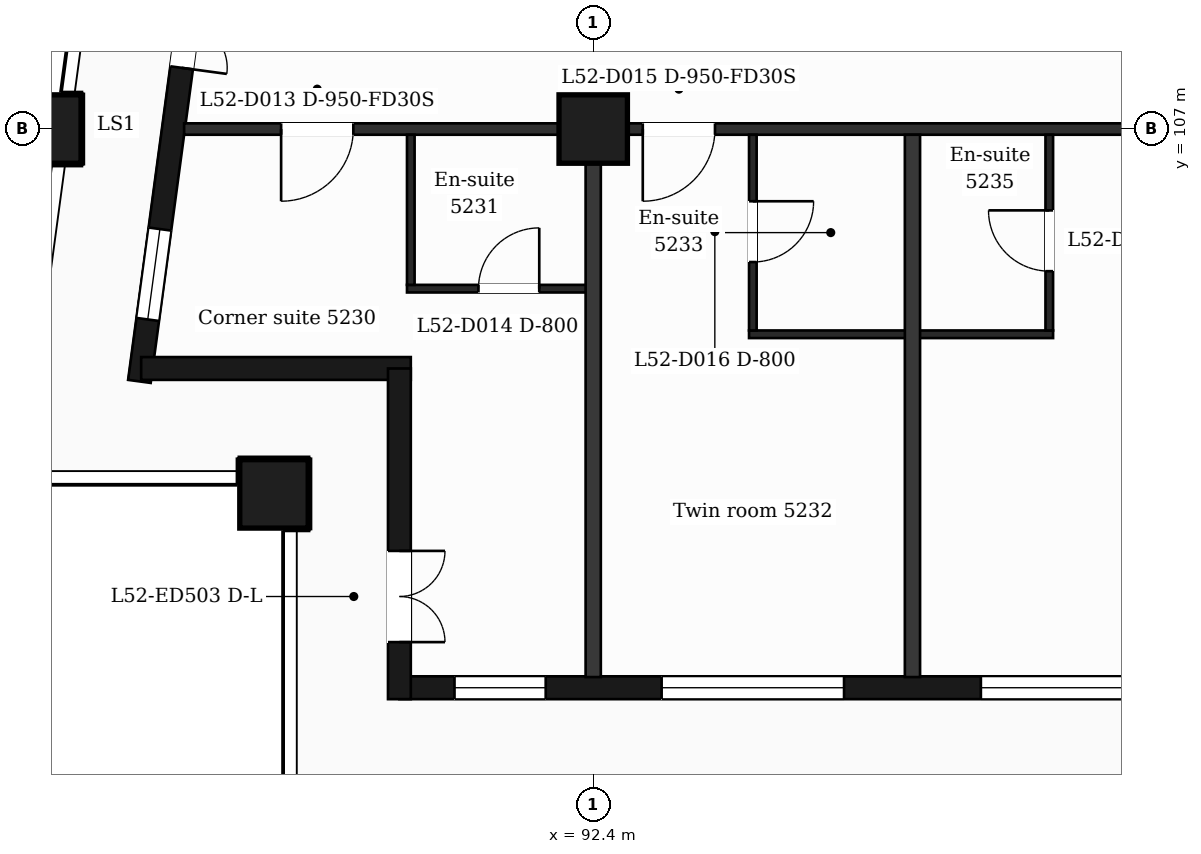
"""IFC4 building model, lengths in metres.
Left out: names, types, materials, properties, quantities, classifications, styles, units other than length and angle.
Written with IfcOpenShell. Run it as: python <this file> out.ifc"""

import sys

from ifc_helpers import new_model, si_unit, direction, frame, frame_2d, origin, origin_2d, place, context, subcontext, project, spatial, rectangle, extrude, element, fill, save


model = new_model("IFC4")
c1 = context("Model", 3, precision=1e-05, world=origin(), true_north=direction((0.0, 1.0)))
c2 = subcontext(c1, "Body", "Model", "MODEL_VIEW")
j1 = project(units=[si_unit("LENGTHUNIT", "METRE"), si_unit("PLANEANGLEUNIT", "RADIAN")], contexts=[c1])
p1 = place(None, origin())
s1 = spatial("IfcSite", under=j1, at=p1, CompositionType="ELEMENT")
p2 = place(p1, origin())
s2 = spatial("IfcBuilding", under=s1, at=p2, CompositionType="ELEMENT")
p3 = place(p2, frame((0.0, 0.0, 217.0)))
s3 = spatial("IfcBuildingStorey", under=s2, at=p3, CompositionType="ELEMENT", Elevation=217.0)
for number, where, z_axis, x_axis in (
    (1, (88.2, 102.2, 0.0), (0.0, 0.0, 1.0), (1.0, 0.0, 0.0)),
    (2, (92.4, 107.0, 0.0), (0.0, 0.0, 1.0), (1.0, 0.0, 0.0)),
    (3, (85.211, 107.0, 0.0), (0.0, 0.0, 1.0), (1.0, 0.0, 0.0)),
):
    element("IfcColumn", number, at=place(p3, frame(where, z_axis=z_axis, x_axis=x_axis)), inside=s3, PredefinedType="COLUMN", context=c2, shape_type="SweptSolid", body=[
        extrude(rectangle(XDim=0.9, YDim=0.9, at=origin_2d()), origin(), (0.0, 0.0, 1.0), 3.7),
    ])
p4 = place(p3, frame((89.85, 99.65, 0.0), z_axis=(0.0, 0.0, 1.0), x_axis=(1.0, 0.0, 0.0)))
e4 = element("IfcWall", 4, at=p4, inside=s3, PredefinedType="SOLIDWALL", context=c2, shape_type="SweptSolid", body=[
    extrude(rectangle(XDim=47.25, YDim=0.3, at=frame_2d((23.625, 0.0))), origin(), (0.0, 0.0, 1.0), 3.38),
])
p5 = place(p4, frame((0.725, 0.0, 0.9)))
e5 = element("IfcOpeningElement", 5, at=p5, cuts=e4, PredefinedType="OPENING", context=c2, shape_type="SweptSolid", body=[
    extrude(rectangle(XDim=1.2, YDim=2.1, at=frame_2d((0.6, 1.05))), frame((0.0, 0.16, 0.0), z_axis=(0.0, -1.0, 0.0), x_axis=(1.0, 0.0, 0.0)), (0.0, 0.0, 1.0), 0.32),
])
p6 = place(p4, frame((3.45, 0.0, 0.9)))
e6 = element("IfcOpeningElement", 6, at=p6, cuts=e4, PredefinedType="OPENING", context=c2, shape_type="SweptSolid", body=[
    extrude(rectangle(XDim=2.4, YDim=2.1, at=frame_2d((1.2, 1.05))), frame((0.0, 0.16, 0.0), z_axis=(0.0, -1.0, 0.0), x_axis=(1.0, 0.0, 0.0)), (0.0, 0.0, 1.0), 0.32),
])
p7 = place(p4, frame((7.65, 0.0, 0.9)))
e7 = element("IfcOpeningElement", 7, at=p7, cuts=e4, PredefinedType="OPENING", context=c2, shape_type="SweptSolid", body=[
    extrude(rectangle(XDim=2.4, YDim=2.1, at=frame_2d((1.2, 1.05))), frame((0.0, 0.16, 0.0), z_axis=(0.0, -1.0, 0.0), x_axis=(1.0, 0.0, 0.0)), (0.0, 0.0, 1.0), 0.32),
])
p8 = place(p4, frame((12.45, 0.0, 0.9)))
e8 = element("IfcOpeningElement", 8, at=p8, cuts=e4, PredefinedType="OPENING", context=c2, shape_type="SweptSolid", body=[
    extrude(rectangle(XDim=1.2, YDim=2.1, at=frame_2d((0.6, 1.05))), frame((0.0, 0.16, 0.0), z_axis=(0.0, -1.0, 0.0), x_axis=(1.0, 0.0, 0.0)), (0.0, 0.0, 1.0), 0.32),
])
p9 = place(p4, frame((16.65, 0.0, 0.9)))
e9 = element("IfcOpeningElement", 9, at=p9, cuts=e4, PredefinedType="OPENING", context=c2, shape_type="SweptSolid", body=[
    extrude(rectangle(XDim=1.2, YDim=2.1, at=frame_2d((0.6, 1.05))), frame((0.0, 0.16, 0.0), z_axis=(0.0, -1.0, 0.0), x_axis=(1.0, 0.0, 0.0)), (0.0, 0.0, 1.0), 0.32),
])
p10 = place(p4, frame((19.95, 0.0, 0.0)))
e10 = element("IfcOpeningElement", 10, at=p10, cuts=e4, PredefinedType="OPENING", context=c2, shape_type="SweptSolid", body=[
    extrude(rectangle(XDim=1.2, YDim=2.4, at=frame_2d((0.6, 1.2))), frame((0.0, 0.16, 0.0), z_axis=(0.0, -1.0, 0.0), x_axis=(1.0, 0.0, 0.0)), (0.0, 0.0, 1.0), 0.32),
])
p11 = place(p4, frame((21.75, 0.0, 0.9)))
e11 = element("IfcOpeningElement", 11, at=p11, cuts=e4, PredefinedType="OPENING", context=c2, shape_type="SweptSolid", body=[
    extrude(rectangle(XDim=1.2, YDim=2.1, at=frame_2d((0.6, 1.05))), frame((0.0, 0.16, 0.0), z_axis=(0.0, -1.0, 0.0), x_axis=(1.0, 0.0, 0.0)), (0.0, 0.0, 1.0), 0.32),
])
p12 = place(p4, frame((24.45, 0.0, 0.9)))
e12 = element("IfcOpeningElement", 12, at=p12, cuts=e4, PredefinedType="OPENING", context=c2, shape_type="SweptSolid", body=[
    extrude(rectangle(XDim=2.4, YDim=2.1, at=frame_2d((1.2, 1.05))), frame((0.0, 0.16, 0.0), z_axis=(0.0, -1.0, 0.0), x_axis=(1.0, 0.0, 0.0)), (0.0, 0.0, 1.0), 0.32),
])
p13 = place(p4, frame((28.35, 0.0, 0.0)))
e13 = element("IfcOpeningElement", 13, at=p13, cuts=e4, PredefinedType="OPENING", context=c2, shape_type="SweptSolid", body=[
    extrude(rectangle(XDim=1.2, YDim=2.4, at=frame_2d((0.6, 1.2))), frame((0.0, 0.16, 0.0), z_axis=(0.0, -1.0, 0.0), x_axis=(1.0, 0.0, 0.0)), (0.0, 0.0, 1.0), 0.32),
])
p14 = place(p4, frame((30.15, 0.0, 0.9)))
e14 = element("IfcOpeningElement", 14, at=p14, cuts=e4, PredefinedType="OPENING", context=c2, shape_type="SweptSolid", body=[
    extrude(rectangle(XDim=1.2, YDim=2.1, at=frame_2d((0.6, 1.05))), frame((0.0, 0.16, 0.0), z_axis=(0.0, -1.0, 0.0), x_axis=(1.0, 0.0, 0.0)), (0.0, 0.0, 1.0), 0.32),
])
p15 = place(p4, frame((32.85, 0.0, 0.9)))
e15 = element("IfcOpeningElement", 15, at=p15, cuts=e4, PredefinedType="OPENING", context=c2, shape_type="SweptSolid", body=[
    extrude(rectangle(XDim=2.4, YDim=2.1, at=frame_2d((1.2, 1.05))), frame((0.0, 0.16, 0.0), z_axis=(0.0, -1.0, 0.0), x_axis=(1.0, 0.0, 0.0)), (0.0, 0.0, 1.0), 0.32),
])
p16 = place(p4, frame((37.05, 0.0, 0.9)))
e16 = element("IfcOpeningElement", 16, at=p16, cuts=e4, PredefinedType="OPENING", context=c2, shape_type="SweptSolid", body=[
    extrude(rectangle(XDim=2.4, YDim=2.1, at=frame_2d((1.2, 1.05))), frame((0.0, 0.16, 0.0), z_axis=(0.0, -1.0, 0.0), x_axis=(1.0, 0.0, 0.0)), (0.0, 0.0, 1.0), 0.32),
])
p17 = place(p4, frame((41.85, 0.0, 0.9)))
e17 = element("IfcOpeningElement", 17, at=p17, cuts=e4, PredefinedType="OPENING", context=c2, shape_type="SweptSolid", body=[
    extrude(rectangle(XDim=1.2, YDim=2.1, at=frame_2d((0.6, 1.05))), frame((0.0, 0.16, 0.0), z_axis=(0.0, -1.0, 0.0), x_axis=(1.0, 0.0, 0.0)), (0.0, 0.0, 1.0), 0.32),
])
p18 = place(p4, frame((45.25, 0.0, 0.9)))
e18 = element("IfcOpeningElement", 18, at=p18, cuts=e4, PredefinedType="OPENING", context=c2, shape_type="SweptSolid", body=[
    extrude(rectangle(XDim=1.2, YDim=2.1, at=frame_2d((0.6, 1.05))), frame((0.0, 0.16, 0.0), z_axis=(0.0, -1.0, 0.0), x_axis=(1.0, 0.0, 0.0)), (0.0, 0.0, 1.0), 0.32),
])
p19 = place(p3, frame((87.334, 110.4, 0.0), z_axis=(0.0, 0.0, 1.0), x_axis=(-0.133437175554, -0.991057273915, 0.0)))
e19 = element("IfcWall", 19, at=p19, inside=s3, PredefinedType="SOLIDWALL", context=c2, shape_type="SweptSolid", body=[
    extrude(rectangle(XDim=6.781, YDim=0.3, at=frame_2d((3.39, 0.0))), origin(), (0.0, 0.0, 1.0), 3.38),
])
p20 = place(p19, frame((1.418, 0.0, 0.0)))
e20 = element("IfcOpeningElement", 20, at=p20, cuts=e19, PredefinedType="OPENING", context=c2, shape_type="SweptSolid", body=[
    extrude(rectangle(XDim=1.2, YDim=2.4, at=frame_2d((0.6, 1.2))), frame((0.0, 0.16, 0.0), z_axis=(0.0, -1.0, 0.0), x_axis=(1.0, 0.0, 0.0)), (0.0, 0.0, 1.0), 0.32),
])
p21 = place(p19, frame((4.758, 0.0, 0.9)))
e21 = element("IfcOpeningElement", 21, at=p21, cuts=e19, PredefinedType="OPENING", context=c2, shape_type="SweptSolid", body=[
    extrude(rectangle(XDim=1.2, YDim=2.1, at=frame_2d((0.6, 1.05))), frame((0.0, 0.16, 0.0), z_axis=(0.0, -1.0, 0.0), x_axis=(1.0, 0.0, 0.0)), (0.0, 0.0, 1.0), 0.32),
])
p22 = place(p3, frame((86.452, 103.85, 0.0), z_axis=(0.0, 0.0, 1.0), x_axis=(1.0, 0.0, 0.0)))
e22 = element("IfcWall", 22, at=p22, inside=s3, PredefinedType="SOLIDWALL", context=c2, shape_type="SweptSolid", body=[
    extrude(rectangle(XDim=3.548, YDim=0.3, at=frame_2d((1.774, 0.0))), origin(), (0.0, 0.0, 1.0), 3.38),
])
p23 = place(p3, frame((89.85, 103.85, 0.0), z_axis=(0.0, 0.0, 1.0), x_axis=(0.0, -1.0, 0.0)))
e23 = element("IfcWall", 23, at=p23, inside=s3, PredefinedType="SOLIDWALL", context=c2, shape_type="SweptSolid", body=[
    extrude(rectangle(XDim=4.35, YDim=0.3, at=frame_2d((2.175, 0.0))), origin(), (0.0, 0.0, 1.0), 3.38),
])
p24 = place(p23, frame((2.4, 0.0, 0.0)))
e24 = element("IfcOpeningElement", 24, at=p24, cuts=e23, PredefinedType="OPENING", context=c2, shape_type="SweptSolid", body=[
    extrude(rectangle(XDim=1.2, YDim=2.4, at=frame_2d((0.6, 1.2))), frame((0.0, 0.16, 0.0), z_axis=(0.0, -1.0, 0.0), x_axis=(1.0, 0.0, 0.0)), (0.0, 0.0, 1.0), 0.32),
])
p25 = place(p3, frame((94.45, 104.3, 0.0), z_axis=(0.0, 0.0, 1.0), x_axis=(1.0, 0.0, 0.0)))
e25 = element("IfcWall", 25, at=p25, inside=s3, PredefinedType="PARTITIONING", context=c2, shape_type="SweptSolid", body=[
    extrude(rectangle(XDim=4.0, YDim=0.1, at=frame_2d((2.0, 0.0))), origin(), (0.0, 0.0, 1.0), 3.38),
])
p26 = place(p3, frame((89.95, 104.9, 0.0), z_axis=(0.0, 0.0, 1.0), x_axis=(1.0, 0.0, 0.0)))
e26 = element("IfcWall", 26, at=p26, inside=s3, PredefinedType="PARTITIONING", context=c2, shape_type="SweptSolid", body=[
    extrude(rectangle(XDim=2.45, YDim=0.1, at=frame_2d((1.225, 0.0))), origin(), (0.0, 0.0, 1.0), 3.38),
])
p27 = place(p26, frame((0.94, 0.0, 0.0)))
e27 = element("IfcOpeningElement", 27, at=p27, cuts=e26, PredefinedType="OPENING", context=c2, shape_type="SweptSolid", body=[
    extrude(rectangle(XDim=0.8, YDim=2.1, at=frame_2d((0.4, 1.05))), frame((0.0, 0.06, 0.0), z_axis=(0.0, -1.0, 0.0), x_axis=(1.0, 0.0, 0.0)), (0.0, 0.0, 1.0), 0.12),
])
p28 = place(p3, frame((87.018, 107.0, 0.0), z_axis=(0.0, 0.0, 1.0), x_axis=(1.0, 0.0, 0.0)))
e28 = element("IfcWall", 28, at=p28, inside=s3, PredefinedType="PARTITIONING", context=c2, shape_type="SweptSolid", body=[
    extrude(rectangle(XDim=52.765, YDim=0.15, at=frame_2d((26.382, 0.0))), origin(), (0.0, 0.0, 1.0), 3.38),
])
p29 = place(p28, frame((1.276, 0.0, 0.0)))
e29 = element("IfcOpeningElement", 29, at=p29, cuts=e28, PredefinedType="OPENING", context=c2, shape_type="SweptSolid", body=[
    extrude(rectangle(XDim=0.95, YDim=2.1, at=frame_2d((0.475, 1.05))), frame((0.0, 0.085, 0.0), z_axis=(0.0, -1.0, 0.0), x_axis=(1.0, 0.0, 0.0)), (0.0, 0.0, 1.0), 0.17),
])
p30 = place(p28, frame((6.034, 0.0, 0.0)))
e30 = element("IfcOpeningElement", 30, at=p30, cuts=e28, PredefinedType="OPENING", context=c2, shape_type="SweptSolid", body=[
    extrude(rectangle(XDim=0.95, YDim=2.1, at=frame_2d((0.475, 1.05))), frame((0.0, 0.085, 0.0), z_axis=(0.0, -1.0, 0.0), x_axis=(1.0, 0.0, 0.0)), (0.0, 0.0, 1.0), 0.17),
])
p31 = place(p28, frame((15.445, 0.0, 0.0)))
e31 = element("IfcOpeningElement", 31, at=p31, cuts=e28, PredefinedType="OPENING", context=c2, shape_type="SweptSolid", body=[
    extrude(rectangle(XDim=0.95, YDim=2.1, at=frame_2d((0.475, 1.05))), frame((0.0, 0.085, 0.0), z_axis=(0.0, -1.0, 0.0), x_axis=(1.0, 0.0, 0.0)), (0.0, 0.0, 1.0), 0.17),
])
p32 = place(p28, frame((18.369, 0.0, 0.0)))
e32 = element("IfcOpeningElement", 32, at=p32, cuts=e28, PredefinedType="OPENING", context=c2, shape_type="SweptSolid", body=[
    extrude(rectangle(XDim=0.95, YDim=2.1, at=frame_2d((0.475, 1.05))), frame((0.0, 0.085, 0.0), z_axis=(0.0, -1.0, 0.0), x_axis=(1.0, 0.0, 0.0)), (0.0, 0.0, 1.0), 0.17),
])
p33 = place(p28, frame((24.519, 0.0, 0.0)))
e33 = element("IfcOpeningElement", 33, at=p33, cuts=e28, PredefinedType="OPENING", context=c2, shape_type="SweptSolid", body=[
    extrude(rectangle(XDim=0.95, YDim=2.1, at=frame_2d((0.475, 1.05))), frame((0.0, 0.085, 0.0), z_axis=(0.0, -1.0, 0.0), x_axis=(1.0, 0.0, 0.0)), (0.0, 0.0, 1.0), 0.17),
])
p34 = place(p28, frame((26.632, 0.0, 0.0)))
e34 = element("IfcOpeningElement", 34, at=p34, cuts=e28, PredefinedType="OPENING", context=c2, shape_type="SweptSolid", body=[
    extrude(rectangle(XDim=1.0, YDim=2.1, at=frame_2d((0.5, 1.05))), frame((0.0, 0.085, 0.0), z_axis=(0.0, -1.0, 0.0), x_axis=(1.0, 0.0, 0.0)), (0.0, 0.0, 1.0), 0.17),
])
p35 = place(p28, frame((33.422, 0.0, 0.0)))
e35 = element("IfcOpeningElement", 35, at=p35, cuts=e28, PredefinedType="OPENING", context=c2, shape_type="SweptSolid", body=[
    extrude(rectangle(XDim=0.95, YDim=2.1, at=frame_2d((0.475, 1.05))), frame((0.0, 0.085, 0.0), z_axis=(0.0, -1.0, 0.0), x_axis=(1.0, 0.0, 0.0)), (0.0, 0.0, 1.0), 0.17),
])
p36 = place(p28, frame((35.057, 0.0, 0.0)))
e36 = element("IfcOpeningElement", 36, at=p36, cuts=e28, PredefinedType="OPENING", context=c2, shape_type="SweptSolid", body=[
    extrude(rectangle(XDim=0.95, YDim=2.1, at=frame_2d((0.475, 1.05))), frame((0.0, 0.085, 0.0), z_axis=(0.0, -1.0, 0.0), x_axis=(1.0, 0.0, 0.0)), (0.0, 0.0, 1.0), 0.17),
])
p37 = place(p28, frame((44.532, 0.0, 0.0)))
e37 = element("IfcOpeningElement", 37, at=p37, cuts=e28, PredefinedType="OPENING", context=c2, shape_type="SweptSolid", body=[
    extrude(rectangle(XDim=1.0, YDim=2.1, at=frame_2d((0.5, 1.05))), frame((0.0, 0.085, 0.0), z_axis=(0.0, -1.0, 0.0), x_axis=(1.0, 0.0, 0.0)), (0.0, 0.0, 1.0), 0.17),
])
p38 = place(p28, frame((48.249, 0.0, 0.0)))
e38 = element("IfcOpeningElement", 38, at=p38, cuts=e28, PredefinedType="OPENING", context=c2, shape_type="SweptSolid", body=[
    extrude(rectangle(XDim=0.95, YDim=2.1, at=frame_2d((0.475, 1.05))), frame((0.0, 0.085, 0.0), z_axis=(0.0, -1.0, 0.0), x_axis=(1.0, 0.0, 0.0)), (0.0, 0.0, 1.0), 0.17),
])
p39 = place(p3, frame((90.0, 104.95, 0.0), z_axis=(0.0, 0.0, 1.0), x_axis=(0.0, 1.0, 0.0)))
e39 = element("IfcWall", 39, at=p39, inside=s3, PredefinedType="PARTITIONING", context=c2, shape_type="SweptSolid", body=[
    extrude(rectangle(XDim=1.975, YDim=0.1, at=frame_2d((0.988, 0.0))), origin(), (0.0, 0.0, 1.0), 3.38),
])
p40 = place(p3, frame((92.4, 99.79, 0.0), z_axis=(0.0, 0.0, 1.0), x_axis=(0.0, 1.0, 0.0)))
e40 = element("IfcWall", 40, at=p40, inside=s3, PredefinedType="PARTITIONING", context=c2, shape_type="SweptSolid", body=[
    extrude(rectangle(XDim=7.135, YDim=0.2, at=frame_2d((3.567, 0.0))), origin(), (0.0, 0.0, 1.0), 3.38),
])
p41 = place(p3, frame((94.5, 104.35, 0.0), z_axis=(0.0, 0.0, 1.0), x_axis=(0.0, 1.0, 0.0)))
e41 = element("IfcWall", 41, at=p41, inside=s3, PredefinedType="PARTITIONING", context=c2, shape_type="SweptSolid", body=[
    extrude(rectangle(XDim=2.575, YDim=0.1, at=frame_2d((1.288, 0.0))), origin(), (0.0, 0.0, 1.0), 3.38),
])
p42 = place(p41, frame((0.9, 0.0, 0.0)))
e42 = element("IfcOpeningElement", 42, at=p42, cuts=e41, PredefinedType="OPENING", context=c2, shape_type="SweptSolid", body=[
    extrude(rectangle(XDim=0.8, YDim=2.1, at=frame_2d((0.4, 1.05))), frame((0.0, 0.06, 0.0), z_axis=(0.0, -1.0, 0.0), x_axis=(1.0, 0.0, 0.0)), (0.0, 0.0, 1.0), 0.12),
])
p43 = place(p3, frame((96.6, 99.79, 0.0), z_axis=(0.0, 0.0, 1.0), x_axis=(0.0, 1.0, 0.0)))
e43 = element("IfcWall", 43, at=p43, inside=s3, PredefinedType="PARTITIONING", context=c2, shape_type="SweptSolid", body=[
    extrude(rectangle(XDim=7.135, YDim=0.2, at=frame_2d((3.567, 0.0))), origin(), (0.0, 0.0, 1.0), 3.38),
])
p44 = place(p3, frame((98.4, 104.35, 0.0), z_axis=(0.0, 0.0, 1.0), x_axis=(0.0, 1.0, 0.0)))
e44 = element("IfcWall", 44, at=p44, inside=s3, PredefinedType="PARTITIONING", context=c2, shape_type="SweptSolid", body=[
    extrude(rectangle(XDim=2.575, YDim=0.1, at=frame_2d((1.288, 0.0))), origin(), (0.0, 0.0, 1.0), 3.38),
])
p45 = place(p44, frame((0.78, 0.0, 0.0)))
e45 = element("IfcOpeningElement", 45, at=p45, cuts=e44, PredefinedType="OPENING", context=c2, shape_type="SweptSolid", body=[
    extrude(rectangle(XDim=0.8, YDim=2.1, at=frame_2d((0.4, 1.05))), frame((0.0, 0.06, 0.0), z_axis=(0.0, -1.0, 0.0), x_axis=(1.0, 0.0, 0.0)), (0.0, 0.0, 1.0), 0.12),
])
p46 = place(p5, origin())
e46 = element("IfcWindow", 46, at=p46, inside=s3, PartitioningType="SINGLE_PANEL", PredefinedType="WINDOW", context=c2, shape_type="SweptSolid", body=[
    extrude(rectangle(XDim=1.2, YDim=2.1, at=frame_2d((0.6, 1.05))), frame((0.0, 0.03, 0.0), z_axis=(0.0, -1.0, 0.0), x_axis=(1.0, 0.0, 0.0)), (0.0, 0.0, 1.0), 0.06),
])
fill(e5, e46)
p47 = place(p6, origin())
e47 = element("IfcWindow", 47, at=p47, inside=s3, PartitioningType="SINGLE_PANEL", PredefinedType="WINDOW", context=c2, shape_type="SweptSolid", body=[
    extrude(rectangle(XDim=2.4, YDim=2.1, at=frame_2d((1.2, 1.05))), frame((0.0, 0.03, 0.0), z_axis=(0.0, -1.0, 0.0), x_axis=(1.0, 0.0, 0.0)), (0.0, 0.0, 1.0), 0.06),
])
fill(e6, e47)
p48 = place(p7, origin())
e48 = element("IfcWindow", 48, at=p48, inside=s3, PartitioningType="SINGLE_PANEL", PredefinedType="WINDOW", context=c2, shape_type="SweptSolid", body=[
    extrude(rectangle(XDim=2.4, YDim=2.1, at=frame_2d((1.2, 1.05))), frame((0.0, 0.03, 0.0), z_axis=(0.0, -1.0, 0.0), x_axis=(1.0, 0.0, 0.0)), (0.0, 0.0, 1.0), 0.06),
])
fill(e7, e48)
p49 = place(p20, origin())
e49 = element("IfcDoor", 49, at=p49, inside=s3, OperationType="DOUBLE_DOOR_SINGLE_SWING", PredefinedType="DOOR", context=c2, shape_type="SweptSolid", body=[
    extrude(rectangle(XDim=1.2, YDim=2.4, at=frame_2d((0.6, 1.2))), frame((0.0, 0.025, 0.0), z_axis=(0.0, -1.0, 0.0), x_axis=(1.0, 0.0, 0.0)), (0.0, 0.0, 1.0), 0.05),
])
fill(e20, e49)
p50 = place(p21, origin())
e50 = element("IfcWindow", 50, at=p50, inside=s3, PartitioningType="SINGLE_PANEL", PredefinedType="WINDOW", context=c2, shape_type="SweptSolid", body=[
    extrude(rectangle(XDim=1.2, YDim=2.1, at=frame_2d((0.6, 1.05))), frame((0.0, 0.03, 0.0), z_axis=(0.0, -1.0, 0.0), x_axis=(1.0, 0.0, 0.0)), (0.0, 0.0, 1.0), 0.06),
])
fill(e21, e50)
p51 = place(p24, origin())
e51 = element("IfcDoor", 51, at=p51, inside=s3, OperationType="DOUBLE_DOOR_SINGLE_SWING", PredefinedType="DOOR", context=c2, shape_type="SweptSolid", body=[
    extrude(rectangle(XDim=1.2, YDim=2.4, at=frame_2d((0.6, 1.2))), frame((0.0, 0.025, 0.0), z_axis=(0.0, -1.0, 0.0), x_axis=(1.0, 0.0, 0.0)), (0.0, 0.0, 1.0), 0.05),
])
fill(e24, e51)
p52 = place(p29, origin())
e52 = element("IfcDoor", 52, at=p52, inside=s3, OperationType="SINGLE_SWING_LEFT", PredefinedType="DOOR", context=c2, shape_type="SweptSolid", body=[
    extrude(rectangle(XDim=0.95, YDim=2.1, at=frame_2d((0.475, 1.05))), frame((0.0, 0.025, 0.0), z_axis=(0.0, -1.0, 0.0), x_axis=(1.0, 0.0, 0.0)), (0.0, 0.0, 1.0), 0.05),
])
fill(e29, e52)
p53 = place(p27, origin())
e53 = element("IfcDoor", 53, at=p53, inside=s3, OperationType="SINGLE_SWING_RIGHT", PredefinedType="DOOR", context=c2, shape_type="SweptSolid", body=[
    extrude(rectangle(XDim=0.8, YDim=2.1, at=frame_2d((0.4, 1.05))), frame((0.0, 0.025, 0.0), z_axis=(0.0, -1.0, 0.0), x_axis=(1.0, 0.0, 0.0)), (0.0, 0.0, 1.0), 0.05),
])
fill(e27, e53)
p54 = place(p30, origin())
e54 = element("IfcDoor", 54, at=p54, inside=s3, OperationType="SINGLE_SWING_LEFT", PredefinedType="DOOR", context=c2, shape_type="SweptSolid", body=[
    extrude(rectangle(XDim=0.95, YDim=2.1, at=frame_2d((0.475, 1.05))), frame((0.0, 0.025, 0.0), z_axis=(0.0, -1.0, 0.0), x_axis=(1.0, 0.0, 0.0)), (0.0, 0.0, 1.0), 0.05),
])
fill(e30, e54)
p55 = place(p42, origin())
e55 = element("IfcDoor", 55, at=p55, inside=s3, OperationType="SINGLE_SWING_RIGHT", PredefinedType="DOOR", context=c2, shape_type="SweptSolid", body=[
    extrude(rectangle(XDim=0.8, YDim=2.1, at=frame_2d((0.4, 1.05))), frame((0.0, 0.025, 0.0), z_axis=(0.0, -1.0, 0.0), x_axis=(1.0, 0.0, 0.0)), (0.0, 0.0, 1.0), 0.05),
])
fill(e42, e55)
p56 = place(p45, origin())
e56 = element("IfcDoor", 56, at=p56, inside=s3, OperationType="SINGLE_SWING_RIGHT", PredefinedType="DOOR", context=c2, shape_type="SweptSolid", body=[
    extrude(rectangle(XDim=0.8, YDim=2.1, at=frame_2d((0.4, 1.05))), frame((0.0, 0.025, 0.0), z_axis=(0.0, -1.0, 0.0), x_axis=(1.0, 0.0, 0.0)), (0.0, 0.0, 1.0), 0.05),
])
fill(e45, e56)
save(model, sys.argv[1])
